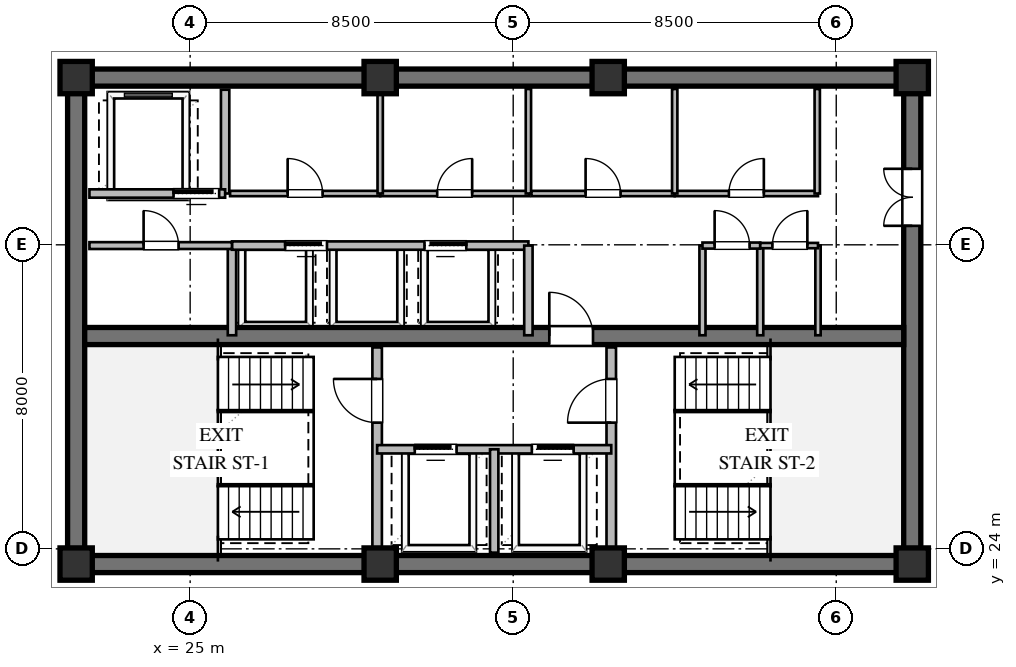
"""IFC4 building model, lengths in metres.
Left out: names, types, materials, properties, quantities, classifications, styles, units other than length and angle.
Written with IfcOpenShell. Run it as: python <this file> out.ifc"""

import sys

from ifc_helpers import new_model, si_unit, direction, frame, frame_2d, origin, origin_2d, place, context, subcontext, project, spatial, rectangle, extrude, element, fill, save


model = new_model("IFC4")
c1 = context("Model", 3, precision=1e-05, world=origin(), true_north=direction((0.0, 1.0)))
c2 = subcontext(c1, "Body", "Model", "MODEL_VIEW")
j1 = project(units=[si_unit("LENGTHUNIT", "METRE"), si_unit("PLANEANGLEUNIT", "RADIAN")], contexts=[c1])
p1 = place(None, origin())
s1 = spatial("IfcSite", under=j1, at=p1, CompositionType="ELEMENT")
p2 = place(p1, origin())
s2 = spatial("IfcBuilding", under=s1, at=p2, CompositionType="ELEMENT")
p3 = place(p2, frame((0.0, 0.0, 210.0)))
s3 = spatial("IfcBuildingStorey", under=s2, at=p3, CompositionType="ELEMENT", Elevation=210.0)
for number, where, z_axis, x_axis in (
    (1, (21.775, 23.6, 0.0), (0.0, 0.0, 1.0), (1.0, 0.0, 0.0)),
    (2, (21.775, 36.4, 0.0), (0.0, 0.0, 1.0), (1.0, 0.0, 0.0)),
):
    element("IfcWall", number, at=place(p3, frame(where, z_axis=z_axis, x_axis=x_axis)), inside=s3, PredefinedType="SHEAR", context=c2, shape_type="SweptSolid", body=[
        extrude(rectangle(XDim=22.45, YDim=0.45, at=frame_2d((11.225, 0.0))), origin(), (0.0, 0.0, 1.0), 3.36),
    ])
p4 = place(p3, frame((22.0, 23.825, 0.0), z_axis=(0.0, 0.0, 1.0), x_axis=(0.0, 1.0, 0.0)))
e3 = element("IfcWall", 3, at=p4, inside=s3, PredefinedType="SHEAR", context=c2, shape_type="SweptSolid", body=[
    extrude(rectangle(XDim=12.35, YDim=0.45, at=frame_2d((6.175, 0.0))), origin(), (0.0, 0.0, 1.0), 3.36),
])
p5 = place(p3, frame((44.0, 23.825, 0.0), z_axis=(0.0, 0.0, 1.0), x_axis=(0.0, 1.0, 0.0)))
e4 = element("IfcWall", 4, at=p5, inside=s3, PredefinedType="SHEAR", context=c2, shape_type="SweptSolid", body=[
    extrude(rectangle(XDim=12.35, YDim=0.45, at=frame_2d((6.175, 0.0))), origin(), (0.0, 0.0, 1.0), 3.36),
])
p6 = place(p5, frame((8.675, 0.0, 0.0)))
e5 = element("IfcOpeningElement", 5, at=p6, cuts=e4, PredefinedType="OPENING", context=c2, shape_type="SweptSolid", body=[
    extrude(rectangle(XDim=1.5, YDim=2.15, at=frame_2d((0.75, 1.075))), frame((0.0, 0.235, 0.0), z_axis=(0.0, -1.0, 0.0), x_axis=(1.0, 0.0, 0.0)), (0.0, 0.0, 1.0), 0.47),
])
p7 = place(p3, frame((22.225, 29.6, 0.0), z_axis=(0.0, 0.0, 1.0), x_axis=(1.0, 0.0, 0.0)))
e6 = element("IfcWall", 6, at=p7, inside=s3, PredefinedType="SHEAR", context=c2, shape_type="SweptSolid", body=[
    extrude(rectangle(XDim=21.55, YDim=0.45, at=frame_2d((10.775, 0.0))), origin(), (0.0, 0.0, 1.0), 3.36),
])
p8 = place(p7, frame((12.225, 0.0, 0.0)))
e7 = element("IfcOpeningElement", 7, at=p8, cuts=e6, PredefinedType="OPENING", context=c2, shape_type="SweptSolid", body=[
    extrude(rectangle(XDim=1.15, YDim=2.1, at=frame_2d((0.575, 1.05))), frame((0.0, 0.235, 0.0), z_axis=(0.0, -1.0, 0.0), x_axis=(1.0, 0.0, 0.0)), (0.0, 0.0, 1.0), 0.47),
])
for number, where, z_axis, x_axis in (
    (8, (22.0, 23.6, 0.0), (0.0, 0.0, 1.0), (1.0, 0.0, 0.0)),
    (9, (30.0, 23.6, 0.0), (0.0, 0.0, 1.0), (1.0, 0.0, 0.0)),
    (10, (36.0, 23.6, 0.0), (0.0, 0.0, 1.0), (1.0, 0.0, 0.0)),
    (11, (44.0, 23.6, 0.0), (0.0, 0.0, 1.0), (1.0, 0.0, 0.0)),
    (12, (44.0, 36.4, 0.0), (0.0, 0.0, 1.0), (1.0, 0.0, 0.0)),
    (13, (36.0, 36.4, 0.0), (0.0, 0.0, 1.0), (1.0, 0.0, 0.0)),
    (14, (30.0, 36.4, 0.0), (0.0, 0.0, 1.0), (1.0, 0.0, 0.0)),
    (15, (22.0, 36.4, 0.0), (0.0, 0.0, 1.0), (1.0, 0.0, 0.0)),
):
    element("IfcColumn", number, at=place(p3, frame(where, z_axis=z_axis, x_axis=x_axis)), inside=s3, PredefinedType="COLUMN", context=c2, shape_type="SweptSolid", body=[
        extrude(rectangle(XDim=0.85, YDim=0.85, at=origin_2d()), origin(), (0.0, 0.0, 1.0), 3.6),
    ])
p9 = place(p3, frame((29.92, 23.9, 0.0), z_axis=(0.0, 0.0, 1.0), x_axis=(0.0, 1.0, 0.0)))
e16 = element("IfcWall", 16, at=p9, inside=s3, PredefinedType="SOLIDWALL", context=c2, shape_type="SweptSolid", body=[
    extrude(rectangle(XDim=5.4, YDim=0.25, at=frame_2d((2.7, 0.0))), origin(), (0.0, 0.0, 1.0), 3.36),
])
p10 = place(p9, frame((3.421, 0.0, 0.0)))
e17 = element("IfcOpeningElement", 17, at=p10, cuts=e16, PredefinedType="OPENING", context=c2, shape_type="SweptSolid", body=[
    extrude(rectangle(XDim=1.15, YDim=2.1, at=frame_2d((0.575, 1.05))), frame((0.0, 0.135, 0.0), z_axis=(0.0, -1.0, 0.0), x_axis=(1.0, 0.0, 0.0)), (0.0, 0.0, 1.0), 0.27),
])
p11 = place(p3, frame((36.08, 23.9, 0.0), z_axis=(0.0, 0.0, 1.0), x_axis=(0.0, 1.0, 0.0)))
e18 = element("IfcWall", 18, at=p11, inside=s3, PredefinedType="SOLIDWALL", context=c2, shape_type="SweptSolid", body=[
    extrude(rectangle(XDim=5.4, YDim=0.25, at=frame_2d((2.7, 0.0))), origin(), (0.0, 0.0, 1.0), 3.36),
])
p12 = place(p11, frame((3.421, 0.0, 0.0)))
e19 = element("IfcOpeningElement", 19, at=p12, cuts=e18, PredefinedType="OPENING", context=c2, shape_type="SweptSolid", body=[
    extrude(rectangle(XDim=1.15, YDim=2.1, at=frame_2d((0.575, 1.05))), frame((0.0, 0.135, 0.0), z_axis=(0.0, -1.0, 0.0), x_axis=(1.0, 0.0, 0.0)), (0.0, 0.0, 1.0), 0.27),
])
p13 = place(p3, frame((29.92, 26.62, 0.0), z_axis=(0.0, 0.0, 1.0), x_axis=(1.0, 0.0, 0.0)))
e20 = element("IfcWall", 20, at=p13, inside=s3, PredefinedType="SOLIDWALL", context=c2, shape_type="SweptSolid", body=[
    extrude(rectangle(XDim=6.16, YDim=0.22, at=frame_2d((3.08, 0.0))), origin(), (0.0, 0.0, 1.0), 3.36),
])
p14 = place(p13, frame((0.99, 0.0, 0.0)))
e21 = element("IfcOpeningElement", 21, at=p14, cuts=e20, PredefinedType="OPENING", context=c2, shape_type="SweptSolid", body=[
    extrude(rectangle(XDim=1.1, YDim=2.1, at=frame_2d((0.55, 1.05))), frame((0.0, 0.12, 0.0), z_axis=(0.0, -1.0, 0.0), x_axis=(1.0, 0.0, 0.0)), (0.0, 0.0, 1.0), 0.24),
])
p15 = place(p13, frame((4.07, 0.0, 0.0)))
e22 = element("IfcOpeningElement", 22, at=p15, cuts=e20, PredefinedType="OPENING", context=c2, shape_type="SweptSolid", body=[
    extrude(rectangle(XDim=1.1, YDim=2.1, at=frame_2d((0.55, 1.05))), frame((0.0, 0.12, 0.0), z_axis=(0.0, -1.0, 0.0), x_axis=(1.0, 0.0, 0.0)), (0.0, 0.0, 1.0), 0.24),
])
p16 = place(p3, frame((33.0, 23.9, 0.0), z_axis=(0.0, 0.0, 1.0), x_axis=(0.0, 1.0, 0.0)))
e23 = element("IfcWall", 23, at=p16, inside=s3, PredefinedType="SOLIDWALL", context=c2, shape_type="SweptSolid", body=[
    extrude(rectangle(XDim=2.72, YDim=0.22, at=frame_2d((1.36, 0.0))), origin(), (0.0, 0.0, 1.0), 3.36),
])
p17 = place(p3, frame((25.92, 33.35, 0.0), z_axis=(0.0, 0.0, 1.0), x_axis=(0.0, 1.0, 0.0)))
e24 = element("IfcWall", 24, at=p17, inside=s3, PredefinedType="SOLIDWALL", context=c2, shape_type="SweptSolid", body=[
    extrude(rectangle(XDim=2.73, YDim=0.22, at=frame_2d((1.365, 0.0))), origin(), (0.0, 0.0, 1.0), 3.36),
])
p18 = place(p3, frame((22.35, 33.35, 0.0), z_axis=(0.0, 0.0, 1.0), x_axis=(1.0, 0.0, 0.0)))
e25 = element("IfcWall", 25, at=p18, inside=s3, PredefinedType="SOLIDWALL", context=c2, shape_type="SweptSolid", body=[
    extrude(rectangle(XDim=3.57, YDim=0.22, at=frame_2d((1.785, 0.0))), origin(), (0.0, 0.0, 1.0), 3.36),
])
p19 = place(p18, frame((2.213, 0.0, 0.0)))
e26 = element("IfcOpeningElement", 26, at=p19, cuts=e25, PredefinedType="OPENING", context=c2, shape_type="SweptSolid", body=[
    extrude(rectangle(XDim=1.2, YDim=2.1, at=frame_2d((0.6, 1.05))), frame((0.0, 0.12, 0.0), z_axis=(0.0, -1.0, 0.0), x_axis=(1.0, 0.0, 0.0)), (0.0, 0.0, 1.0), 0.24),
])
p20 = place(p3, frame((26.1, 29.62, 0.0), z_axis=(0.0, 0.0, 1.0), x_axis=(0.0, 1.0, 0.0)))
e27 = element("IfcWall", 27, at=p20, inside=s3, PredefinedType="SOLIDWALL", context=c2, shape_type="SweptSolid", body=[
    extrude(rectangle(XDim=2.36, YDim=0.22, at=frame_2d((1.18, 0.0))), origin(), (0.0, 0.0, 1.0), 3.36),
])
p21 = place(p3, frame((26.1, 31.98, 0.0), z_axis=(0.0, 0.0, 1.0), x_axis=(1.0, 0.0, 0.0)))
e28 = element("IfcWall", 28, at=p21, inside=s3, PredefinedType="SOLIDWALL", context=c2, shape_type="SweptSolid", body=[
    extrude(rectangle(XDim=7.8, YDim=0.22, at=frame_2d((3.9, 0.0))), origin(), (0.0, 0.0, 1.0), 3.36),
])
p22 = place(p21, frame((1.4, 0.0, 0.0)))
e29 = element("IfcOpeningElement", 29, at=p22, cuts=e28, PredefinedType="OPENING", context=c2, shape_type="SweptSolid", body=[
    extrude(rectangle(XDim=1.1, YDim=2.1, at=frame_2d((0.55, 1.05))), frame((0.0, 0.12, 0.0), z_axis=(0.0, -1.0, 0.0), x_axis=(1.0, 0.0, 0.0)), (0.0, 0.0, 1.0), 0.24),
])
p23 = place(p21, frame((5.066, 0.0, 0.0)))
e30 = element("IfcOpeningElement", 30, at=p23, cuts=e28, PredefinedType="OPENING", context=c2, shape_type="SweptSolid", body=[
    extrude(rectangle(XDim=1.1, YDim=2.1, at=frame_2d((0.55, 1.05))), frame((0.0, 0.12, 0.0), z_axis=(0.0, -1.0, 0.0), x_axis=(1.0, 0.0, 0.0)), (0.0, 0.0, 1.0), 0.24),
])
p24 = place(p3, frame((33.9, 29.62, 0.0), z_axis=(0.0, 0.0, 1.0), x_axis=(0.0, 1.0, 0.0)))
e31 = element("IfcWall", 31, at=p24, inside=s3, PredefinedType="SOLIDWALL", context=c2, shape_type="SweptSolid", body=[
    extrude(rectangle(XDim=2.36, YDim=0.22, at=frame_2d((1.18, 0.0))), origin(), (0.0, 0.0, 1.0), 3.36),
])
p25 = place(p3, frame((26.05, 33.35, 0.0), z_axis=(0.0, 0.0, 1.0), x_axis=(1.0, 0.0, 0.0)))
e32 = element("IfcWall", 32, at=p25, inside=s3, PredefinedType="PARTITIONING", context=c2, shape_type="SweptSolid", body=[
    extrude(rectangle(XDim=3.95, YDim=0.14, at=frame_2d((1.975, 0.0))), origin(), (0.0, 0.0, 1.0), 3.36),
])
p26 = place(p25, frame((1.515, 0.0, 0.0)))
e33 = element("IfcOpeningElement", 33, at=p26, cuts=e32, PredefinedType="OPENING", context=c2, shape_type="SweptSolid", body=[
    extrude(rectangle(XDim=0.92, YDim=2.1, at=frame_2d((0.46, 1.05))), frame((0.0, 0.08, 0.0), z_axis=(0.0, -1.0, 0.0), x_axis=(1.0, 0.0, 0.0)), (0.0, 0.0, 1.0), 0.16),
])
p27 = place(p3, frame((30.0, 33.35, 0.0), z_axis=(0.0, 0.0, 1.0), x_axis=(1.0, 0.0, 0.0)))
e34 = element("IfcWall", 34, at=p27, inside=s3, PredefinedType="PARTITIONING", context=c2, shape_type="SweptSolid", body=[
    extrude(rectangle(XDim=3.92, YDim=0.14, at=frame_2d((1.96, 0.0))), origin(), (0.0, 0.0, 1.0), 3.36),
])
p28 = place(p27, frame((1.5, 0.0, 0.0)))
e35 = element("IfcOpeningElement", 35, at=p28, cuts=e34, PredefinedType="OPENING", context=c2, shape_type="SweptSolid", body=[
    extrude(rectangle(XDim=0.92, YDim=2.1, at=frame_2d((0.46, 1.05))), frame((0.0, 0.08, 0.0), z_axis=(0.0, -1.0, 0.0), x_axis=(1.0, 0.0, 0.0)), (0.0, 0.0, 1.0), 0.16),
])
for number, where, z_axis, x_axis in (
    (36, (30.0, 33.35, 0.0), (0.0, 0.0, 1.0), (0.0, 1.0, 0.0)),
    (37, (33.9, 33.35, 0.0), (0.0, 0.0, 1.0), (0.0, 1.0, 0.0)),
):
    element("IfcWall", number, at=place(p3, frame(where, z_axis=z_axis, x_axis=x_axis)), inside=s3, PredefinedType="PARTITIONING", context=c2, shape_type="SweptSolid", body=[
        extrude(rectangle(XDim=2.75, YDim=0.14, at=frame_2d((1.375, 0.0))), origin(), (0.0, 0.0, 1.0), 3.36),
    ])
p29 = place(p3, frame((33.98, 33.35, 0.0), z_axis=(0.0, 0.0, 1.0), x_axis=(1.0, 0.0, 0.0)))
e38 = element("IfcWall", 38, at=p29, inside=s3, PredefinedType="PARTITIONING", context=c2, shape_type="SweptSolid", body=[
    extrude(rectangle(XDim=3.77, YDim=0.14, at=frame_2d((1.885, 0.0))), origin(), (0.0, 0.0, 1.0), 3.36),
])
p30 = place(p29, frame((1.425, 0.0, 0.0)))
e39 = element("IfcOpeningElement", 39, at=p30, cuts=e38, PredefinedType="OPENING", context=c2, shape_type="SweptSolid", body=[
    extrude(rectangle(XDim=0.92, YDim=2.1, at=frame_2d((0.46, 1.05))), frame((0.0, 0.08, 0.0), z_axis=(0.0, -1.0, 0.0), x_axis=(1.0, 0.0, 0.0)), (0.0, 0.0, 1.0), 0.16),
])
p31 = place(p3, frame((37.75, 33.35, 0.0), z_axis=(0.0, 0.0, 1.0), x_axis=(1.0, 0.0, 0.0)))
e40 = element("IfcWall", 40, at=p31, inside=s3, PredefinedType="PARTITIONING", context=c2, shape_type="SweptSolid", body=[
    extrude(rectangle(XDim=3.77, YDim=0.14, at=frame_2d((1.885, 0.0))), origin(), (0.0, 0.0, 1.0), 3.36),
])
p32 = place(p31, frame((1.425, 0.0, 0.0)))
e41 = element("IfcOpeningElement", 41, at=p32, cuts=e40, PredefinedType="OPENING", context=c2, shape_type="SweptSolid", body=[
    extrude(rectangle(XDim=0.92, YDim=2.1, at=frame_2d((0.46, 1.05))), frame((0.0, 0.08, 0.0), z_axis=(0.0, -1.0, 0.0), x_axis=(1.0, 0.0, 0.0)), (0.0, 0.0, 1.0), 0.16),
])
for number, where, z_axis, x_axis in (
    (42, (37.75, 33.35, 0.0), (0.0, 0.0, 1.0), (0.0, 1.0, 0.0)),
    (43, (41.5, 33.35, 0.0), (0.0, 0.0, 1.0), (0.0, 1.0, 0.0)),
):
    element("IfcWall", number, at=place(p3, frame(where, z_axis=z_axis, x_axis=x_axis)), inside=s3, PredefinedType="PARTITIONING", context=c2, shape_type="SweptSolid", body=[
        extrude(rectangle(XDim=2.75, YDim=0.14, at=frame_2d((1.375, 0.0))), origin(), (0.0, 0.0, 1.0), 3.36),
    ])
p33 = place(p3, frame((22.35, 31.98, 0.0), z_axis=(0.0, 0.0, 1.0), x_axis=(1.0, 0.0, 0.0)))
e44 = element("IfcWall", 44, at=p33, inside=s3, PredefinedType="PARTITIONING", context=c2, shape_type="SweptSolid", body=[
    extrude(rectangle(XDim=3.75, YDim=0.18, at=frame_2d((1.875, 0.0))), origin(), (0.0, 0.0, 1.0), 3.36),
])
p34 = place(p33, frame((1.425, 0.0, 0.0)))
e45 = element("IfcOpeningElement", 45, at=p34, cuts=e44, PredefinedType="OPENING", context=c2, shape_type="SweptSolid", body=[
    extrude(rectangle(XDim=0.92, YDim=2.1, at=frame_2d((0.46, 1.05))), frame((0.0, 0.1, 0.0), z_axis=(0.0, -1.0, 0.0), x_axis=(1.0, 0.0, 0.0)), (0.0, 0.0, 1.0), 0.2),
])
for number, where, z_axis, x_axis in (
    (46, (38.48, 29.62, 0.0), (0.0, 0.0, 1.0), (0.0, 1.0, 0.0)),
    (47, (40.0, 29.62, 0.0), (0.0, 0.0, 1.0), (0.0, 1.0, 0.0)),
):
    element("IfcWall", number, at=place(p3, frame(where, z_axis=z_axis, x_axis=x_axis)), inside=s3, PredefinedType="PLUMBINGWALL", context=c2, shape_type="SweptSolid", body=[
        extrude(rectangle(XDim=2.36, YDim=0.16, at=frame_2d((1.18, 0.0))), origin(), (0.0, 0.0, 1.0), 3.36),
    ])
p35 = place(p3, frame((41.52, 29.62, 0.0), z_axis=(0.0, 0.0, 1.0), x_axis=(0.0, 1.0, 0.0)))
e48 = element("IfcWall", 48, at=p35, inside=s3, PredefinedType="PARTITIONING", context=c2, shape_type="SweptSolid", body=[
    extrude(rectangle(XDim=2.36, YDim=0.14, at=frame_2d((1.18, 0.0))), origin(), (0.0, 0.0, 1.0), 3.36),
])
p36 = place(p3, frame((38.48, 31.98, 0.0), z_axis=(0.0, 0.0, 1.0), x_axis=(1.0, 0.0, 0.0)))
e49 = element("IfcWall", 49, at=p36, inside=s3, PredefinedType="PLUMBINGWALL", context=c2, shape_type="SweptSolid", body=[
    extrude(rectangle(XDim=1.52, YDim=0.16, at=frame_2d((0.76, 0.0))), origin(), (0.0, 0.0, 1.0), 3.36),
])
p37 = place(p36, frame((0.32, 0.0, 0.0)))
e50 = element("IfcOpeningElement", 50, at=p37, cuts=e49, PredefinedType="OPENING", context=c2, shape_type="SweptSolid", body=[
    extrude(rectangle(XDim=0.92, YDim=2.1, at=frame_2d((0.46, 1.05))), frame((0.0, 0.09, 0.0), z_axis=(0.0, -1.0, 0.0), x_axis=(1.0, 0.0, 0.0)), (0.0, 0.0, 1.0), 0.18),
])
p38 = place(p3, frame((40.0, 31.98, 0.0), z_axis=(0.0, 0.0, 1.0), x_axis=(1.0, 0.0, 0.0)))
e51 = element("IfcWall", 51, at=p38, inside=s3, PredefinedType="PARTITIONING", context=c2, shape_type="SweptSolid", body=[
    extrude(rectangle(XDim=1.52, YDim=0.14, at=frame_2d((0.76, 0.0))), origin(), (0.0, 0.0, 1.0), 3.36),
])
p39 = place(p38, frame((0.32, 0.0, 0.0)))
e52 = element("IfcOpeningElement", 52, at=p39, cuts=e51, PredefinedType="OPENING", context=c2, shape_type="SweptSolid", body=[
    extrude(rectangle(XDim=0.92, YDim=2.1, at=frame_2d((0.46, 1.05))), frame((0.0, 0.08, 0.0), z_axis=(0.0, -1.0, 0.0), x_axis=(1.0, 0.0, 0.0)), (0.0, 0.0, 1.0), 0.16),
])
p40 = place(p10, origin())
e53 = element("IfcDoor", 53, at=p40, inside=s3, OperationType="SINGLE_SWING_RIGHT", PredefinedType="DOOR", context=c2, shape_type="SweptSolid", body=[
    extrude(rectangle(XDim=1.15, YDim=2.1, at=frame_2d((0.575, 1.05))), frame((0.0, 0.025, 0.0), z_axis=(0.0, -1.0, 0.0), x_axis=(1.0, 0.0, 0.0)), (0.0, 0.0, 1.0), 0.05),
])
fill(e17, e53)
p41 = place(p12, origin())
e54 = element("IfcDoor", 54, at=p41, inside=s3, OperationType="SINGLE_SWING_LEFT", PredefinedType="DOOR", context=c2, shape_type="SweptSolid", body=[
    extrude(rectangle(XDim=1.15, YDim=2.1, at=frame_2d((0.575, 1.05))), frame((0.0, 0.025, 0.0), z_axis=(0.0, -1.0, 0.0), x_axis=(1.0, 0.0, 0.0)), (0.0, 0.0, 1.0), 0.05),
])
fill(e19, e54)
p42 = place(p14, origin())
e55 = element("IfcDoor", 55, at=p42, inside=s3, OperationType="SLIDING_TO_LEFT", PredefinedType="DOOR", context=c2, shape_type="SweptSolid", body=[
    extrude(rectangle(XDim=1.1, YDim=2.1, at=frame_2d((0.55, 1.05))), frame((0.0, 0.025, 0.0), z_axis=(0.0, -1.0, 0.0), x_axis=(1.0, 0.0, 0.0)), (0.0, 0.0, 1.0), 0.05),
])
fill(e21, e55)
p43 = place(p15, origin())
e56 = element("IfcDoor", 56, at=p43, inside=s3, OperationType="SLIDING_TO_RIGHT", PredefinedType="DOOR", context=c2, shape_type="SweptSolid", body=[
    extrude(rectangle(XDim=1.1, YDim=2.1, at=frame_2d((0.55, 1.05))), frame((0.0, 0.025, 0.0), z_axis=(0.0, -1.0, 0.0), x_axis=(1.0, 0.0, 0.0)), (0.0, 0.0, 1.0), 0.05),
])
fill(e22, e56)
p44 = place(p8, origin())
e57 = element("IfcDoor", 57, at=p44, inside=s3, OperationType="SINGLE_SWING_LEFT", PredefinedType="DOOR", context=c2, shape_type="SweptSolid", body=[
    extrude(rectangle(XDim=1.15, YDim=2.1, at=frame_2d((0.575, 1.05))), frame((0.0, 0.025, 0.0), z_axis=(0.0, -1.0, 0.0), x_axis=(1.0, 0.0, 0.0)), (0.0, 0.0, 1.0), 0.05),
])
fill(e7, e57)
p45 = place(p6, origin())
e58 = element("IfcDoor", 58, at=p45, inside=s3, OperationType="DOUBLE_DOOR_SINGLE_SWING", PredefinedType="DOOR", context=c2, shape_type="SweptSolid", body=[
    extrude(rectangle(XDim=1.5, YDim=2.15, at=frame_2d((0.75, 1.075))), frame((0.0, 0.025, 0.0), z_axis=(0.0, -1.0, 0.0), x_axis=(1.0, 0.0, 0.0)), (0.0, 0.0, 1.0), 0.05),
])
fill(e5, e58)
p46 = place(p19, origin())
e59 = element("IfcDoor", 59, at=p46, inside=s3, OperationType="SLIDING_TO_LEFT", PredefinedType="DOOR", context=c2, shape_type="SweptSolid", body=[
    extrude(rectangle(XDim=1.2, YDim=2.1, at=frame_2d((0.6, 1.05))), frame((0.0, 0.025, 0.0), z_axis=(0.0, -1.0, 0.0), x_axis=(1.0, 0.0, 0.0)), (0.0, 0.0, 1.0), 0.05),
])
fill(e26, e59)
p47 = place(p22, origin())
e60 = element("IfcDoor", 60, at=p47, inside=s3, OperationType="SLIDING_TO_LEFT", PredefinedType="DOOR", context=c2, shape_type="SweptSolid", body=[
    extrude(rectangle(XDim=1.1, YDim=2.1, at=frame_2d((0.55, 1.05))), frame((0.0, 0.025, 0.0), z_axis=(0.0, -1.0, 0.0), x_axis=(1.0, 0.0, 0.0)), (0.0, 0.0, 1.0), 0.05),
])
fill(e29, e60)
p48 = place(p23, origin())
e61 = element("IfcDoor", 61, at=p48, inside=s3, OperationType="SLIDING_TO_RIGHT", PredefinedType="DOOR", context=c2, shape_type="SweptSolid", body=[
    extrude(rectangle(XDim=1.1, YDim=2.1, at=frame_2d((0.55, 1.05))), frame((0.0, 0.025, 0.0), z_axis=(0.0, -1.0, 0.0), x_axis=(1.0, 0.0, 0.0)), (0.0, 0.0, 1.0), 0.05),
])
fill(e30, e61)
p49 = place(p26, origin())
e62 = element("IfcDoor", 62, at=p49, inside=s3, OperationType="SINGLE_SWING_LEFT", PredefinedType="DOOR", context=c2, shape_type="SweptSolid", body=[
    extrude(rectangle(XDim=0.92, YDim=2.1, at=frame_2d((0.46, 1.05))), frame((0.0, 0.025, 0.0), z_axis=(0.0, -1.0, 0.0), x_axis=(1.0, 0.0, 0.0)), (0.0, 0.0, 1.0), 0.05),
])
fill(e33, e62)
p50 = place(p28, origin())
e63 = element("IfcDoor", 63, at=p50, inside=s3, OperationType="SINGLE_SWING_RIGHT", PredefinedType="DOOR", context=c2, shape_type="SweptSolid", body=[
    extrude(rectangle(XDim=0.92, YDim=2.1, at=frame_2d((0.46, 1.05))), frame((0.0, 0.025, 0.0), z_axis=(0.0, -1.0, 0.0), x_axis=(1.0, 0.0, 0.0)), (0.0, 0.0, 1.0), 0.05),
])
fill(e35, e63)
p51 = place(p30, origin())
e64 = element("IfcDoor", 64, at=p51, inside=s3, OperationType="SINGLE_SWING_LEFT", PredefinedType="DOOR", context=c2, shape_type="SweptSolid", body=[
    extrude(rectangle(XDim=0.92, YDim=2.1, at=frame_2d((0.46, 1.05))), frame((0.0, 0.025, 0.0), z_axis=(0.0, -1.0, 0.0), x_axis=(1.0, 0.0, 0.0)), (0.0, 0.0, 1.0), 0.05),
])
fill(e39, e64)
p52 = place(p32, origin())
e65 = element("IfcDoor", 65, at=p52, inside=s3, OperationType="SINGLE_SWING_RIGHT", PredefinedType="DOOR", context=c2, shape_type="SweptSolid", body=[
    extrude(rectangle(XDim=0.92, YDim=2.1, at=frame_2d((0.46, 1.05))), frame((0.0, 0.025, 0.0), z_axis=(0.0, -1.0, 0.0), x_axis=(1.0, 0.0, 0.0)), (0.0, 0.0, 1.0), 0.05),
])
fill(e41, e65)
p53 = place(p34, origin())
e66 = element("IfcDoor", 66, at=p53, inside=s3, OperationType="SINGLE_SWING_LEFT", PredefinedType="DOOR", context=c2, shape_type="SweptSolid", body=[
    extrude(rectangle(XDim=0.92, YDim=2.1, at=frame_2d((0.46, 1.05))), frame((0.0, 0.025, 0.0), z_axis=(0.0, -1.0, 0.0), x_axis=(1.0, 0.0, 0.0)), (0.0, 0.0, 1.0), 0.05),
])
fill(e45, e66)
p54 = place(p37, origin())
e67 = element("IfcDoor", 67, at=p54, inside=s3, OperationType="SINGLE_SWING_LEFT", PredefinedType="DOOR", context=c2, shape_type="SweptSolid", body=[
    extrude(rectangle(XDim=0.92, YDim=2.1, at=frame_2d((0.46, 1.05))), frame((0.0, 0.025, 0.0), z_axis=(0.0, -1.0, 0.0), x_axis=(1.0, 0.0, 0.0)), (0.0, 0.0, 1.0), 0.05),
])
fill(e50, e67)
p55 = place(p39, origin())
e68 = element("IfcDoor", 68, at=p55, inside=s3, OperationType="SINGLE_SWING_RIGHT", PredefinedType="DOOR", context=c2, shape_type="SweptSolid", body=[
    extrude(rectangle(XDim=0.92, YDim=2.1, at=frame_2d((0.46, 1.05))), frame((0.0, 0.025, 0.0), z_axis=(0.0, -1.0, 0.0), x_axis=(1.0, 0.0, 0.0)), (0.0, 0.0, 1.0), 0.05),
])
fill(e52, e68)
save(model, sys.argv[1])
